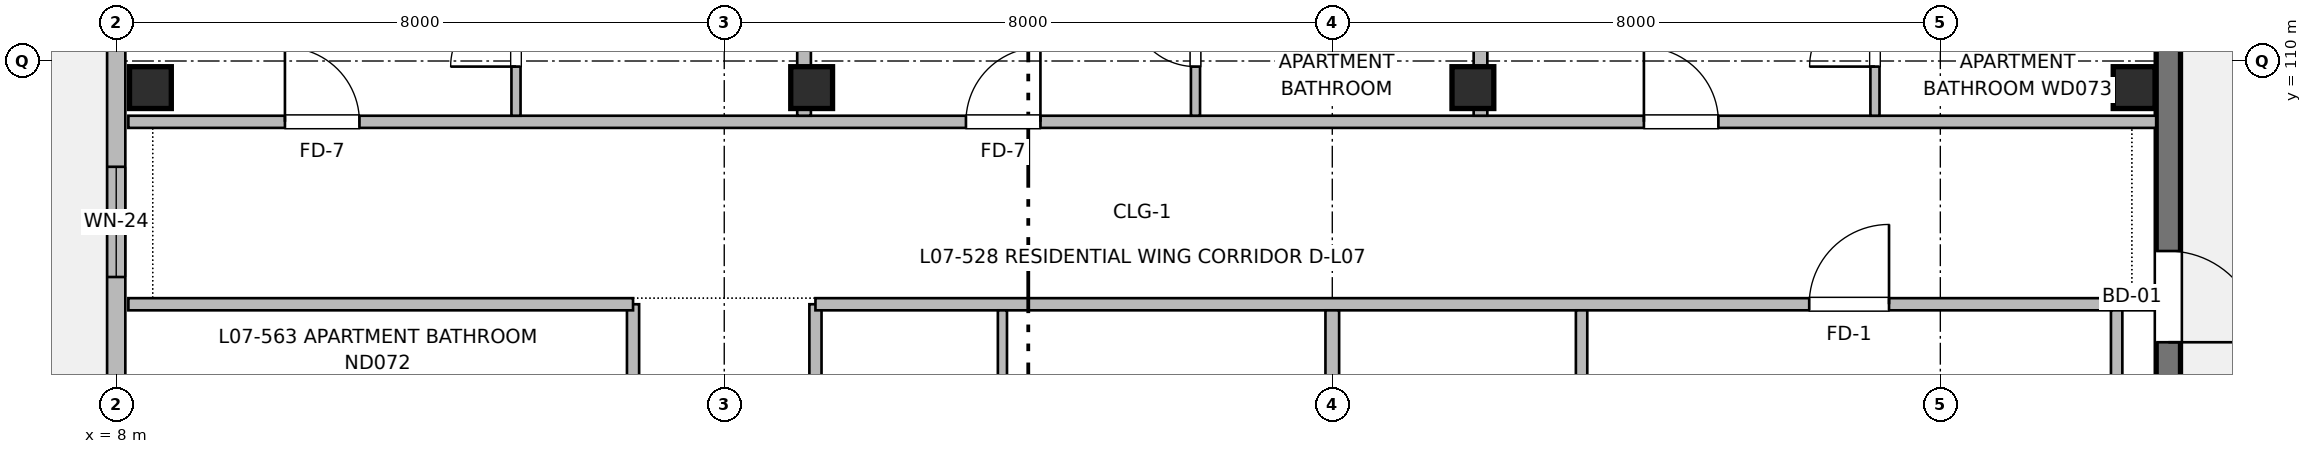
"""IFC4 building model, lengths in metres.
Left out: names, types, materials, properties, quantities, classifications, styles, units other than length and angle.
Written with IfcOpenShell. Run it as: python <this file> out.ifc"""

import sys

from ifc_helpers import new_model, si_unit, direction, frame, frame_2d, origin, origin_2d, place, context, subcontext, project, spatial, rectangle, extrude, element, fill, save


model = new_model("IFC4")
c1 = context("Model", 3, precision=1e-05, world=origin(), true_north=direction((0.0, 1.0)))
c2 = subcontext(c1, "Body", "Model", "MODEL_VIEW")
j1 = project(units=[si_unit("LENGTHUNIT", "METRE"), si_unit("PLANEANGLEUNIT", "RADIAN")], contexts=[c1])
p1 = place(None, origin())
s1 = spatial("IfcSite", under=j1, at=p1, CompositionType="ELEMENT")
p2 = place(p1, origin())
s2 = spatial("IfcBuilding", under=s1, at=p2, CompositionType="ELEMENT")
p3 = place(p2, frame((0.0, 0.0, 23.36)))
s3 = spatial("IfcBuildingStorey", under=s2, at=p3, CompositionType="ELEMENT", Elevation=23.36)
for number, where, z_axis, x_axis in (
    (1, (8.45, 109.65, 0.0), (0.0, 0.0, 1.0), (1.0, 0.0, 0.0)),
    (2, (17.15, 109.65, 0.0), (0.0, 0.0, 1.0), (1.0, 0.0, 0.0)),
    (3, (25.85, 109.65, 0.0), (0.0, 0.0, 1.0), (1.0, 0.0, 0.0)),
    (4, (34.55, 109.65, 0.0), (0.0, 0.0, 1.0), (1.0, 0.0, 0.0)),
):
    element("IfcColumn", number, at=place(p3, frame(where, z_axis=z_axis, x_axis=x_axis)), inside=s3, PredefinedType="COLUMN", context=c2, shape_type="SweptSolid", body=[
        extrude(rectangle(XDim=0.55, YDim=0.55, at=origin_2d()), origin(), (0.0, 0.0, 1.0), 3.2),
    ])
p4 = place(p3, frame((35.0, 113.8, 0.0), z_axis=(0.0, 0.0, 1.0), x_axis=(0.0, -1.0, 0.0)))
e5 = element("IfcWall", 5, at=p4, inside=s3, PredefinedType="SHEAR", context=c2, shape_type="SweptSolid", body=[
    extrude(rectangle(XDim=13.8, YDim=0.32, at=frame_2d((6.9, 0.0))), origin(), (0.0, 0.0, 1.0), 2.98),
])
p5 = place(p4, frame((6.3, 0.0, 0.0)))
e6 = element("IfcOpeningElement", 6, at=p5, cuts=e5, PredefinedType="OPENING", context=c2, shape_type="SweptSolid", body=[
    extrude(rectangle(XDim=1.2, YDim=2.2, at=frame_2d((0.6, 1.1))), frame((0.0, 0.17, 0.0), z_axis=(0.0, -1.0, 0.0), x_axis=(1.0, 0.0, 0.0)), (0.0, 0.0, 1.0), 0.34),
])
p6 = place(p4, frame((8.2, 0.0, 0.67)))
e7 = element("IfcOpeningElement", 7, at=p6, cuts=e5, PredefinedType="OPENING", context=c2, shape_type="SweptSolid", body=[
    extrude(rectangle(XDim=2.6, YDim=1.55, at=frame_2d((1.3, 0.775))), frame((0.0, 0.17, 0.0), z_axis=(0.0, -1.0, 0.0), x_axis=(1.0, 0.0, 0.0)), (0.0, 0.0, 1.0), 0.34),
])
p7 = place(p3, frame((8.0, 64.4, 0.0), z_axis=(0.0, 0.0, 1.0), x_axis=(0.0, 1.0, 0.0)))
e8 = element("IfcWall", 8, at=p7, inside=s3, PredefinedType="SOLIDWALL", context=c2, shape_type="SweptSolid", body=[
    extrude(rectangle(XDim=49.4, YDim=0.24, at=frame_2d((24.7, 0.0))), origin(), (0.0, 0.0, 1.0), 2.98),
])
p8 = place(p7, frame((3.792, 0.0, 0.9)))
e9 = element("IfcOpeningElement", 9, at=p8, cuts=e8, PredefinedType="OPENING", context=c2, shape_type="SweptSolid", body=[
    extrude(rectangle(XDim=0.65, YDim=0.95, at=frame_2d((0.325, 0.475))), frame((0.0, 0.13, 0.0), z_axis=(0.0, -1.0, 0.0), x_axis=(1.0, 0.0, 0.0)), (0.0, 0.0, 1.0), 0.26),
])
p9 = place(p7, frame((11.8, 0.0, 0.62)))
e10 = element("IfcOpeningElement", 10, at=p9, cuts=e8, PredefinedType="OPENING", context=c2, shape_type="SweptSolid", body=[
    extrude(rectangle(XDim=1.1, YDim=1.6, at=frame_2d((0.55, 0.8))), frame((0.0, 0.13, 0.0), z_axis=(0.0, -1.0, 0.0), x_axis=(1.0, 0.0, 0.0)), (0.0, 0.0, 1.0), 0.26),
])
p10 = place(p7, frame((18.683, 0.0, 0.0)))
e11 = element("IfcOpeningElement", 11, at=p10, cuts=e8, PredefinedType="OPENING", context=c2, shape_type="SweptSolid", body=[
    extrude(rectangle(XDim=1.2, YDim=2.2, at=frame_2d((0.6, 1.1))), frame((0.0, 0.13, 0.0), z_axis=(0.0, -1.0, 0.0), x_axis=(1.0, 0.0, 0.0)), (0.0, 0.0, 1.0), 0.26),
])
p11 = place(p7, frame((21.883, 0.0, 0.72)))
e12 = element("IfcOpeningElement", 12, at=p11, cuts=e8, PredefinedType="OPENING", context=c2, shape_type="SweptSolid", body=[
    extrude(rectangle(XDim=1.8, YDim=1.5, at=frame_2d((0.9, 0.75))), frame((0.0, 0.13, 0.0), z_axis=(0.0, -1.0, 0.0), x_axis=(1.0, 0.0, 0.0)), (0.0, 0.0, 1.0), 0.26),
])
p12 = place(p7, frame((29.267, 0.0, 0.72)))
e13 = element("IfcOpeningElement", 13, at=p12, cuts=e8, PredefinedType="OPENING", context=c2, shape_type="SweptSolid", body=[
    extrude(rectangle(XDim=1.7, YDim=1.5, at=frame_2d((0.85, 0.75))), frame((0.0, 0.13, 0.0), z_axis=(0.0, -1.0, 0.0), x_axis=(1.0, 0.0, 0.0)), (0.0, 0.0, 1.0), 0.26),
])
p13 = place(p7, frame((32.9, 0.0, 0.57)))
e14 = element("IfcOpeningElement", 14, at=p13, cuts=e8, PredefinedType="OPENING", context=c2, shape_type="SweptSolid", body=[
    extrude(rectangle(XDim=2.3, YDim=1.65, at=frame_2d((1.15, 0.825))), frame((0.0, 0.13, 0.0), z_axis=(0.0, -1.0, 0.0), x_axis=(1.0, 0.0, 0.0)), (0.0, 0.0, 1.0), 0.26),
])
p14 = place(p7, frame((42.758, 0.0, 0.77)))
e15 = element("IfcOpeningElement", 15, at=p14, cuts=e8, PredefinedType="OPENING", context=c2, shape_type="SweptSolid", body=[
    extrude(rectangle(XDim=1.45, YDim=1.45, at=frame_2d((0.725, 0.725))), frame((0.0, 0.13, 0.0), z_axis=(0.0, -1.0, 0.0), x_axis=(1.0, 0.0, 0.0)), (0.0, 0.0, 1.0), 0.26),
])
p15 = place(p3, frame((14.8, 64.56, 0.0), z_axis=(0.0, 0.0, 1.0), x_axis=(0.0, 1.0, 0.0)))
e16 = element("IfcWall", 16, at=p15, inside=s3, PredefinedType="PARTITIONING", context=c2, shape_type="SweptSolid", body=[
    extrude(rectangle(XDim=42.24, YDim=0.16, at=frame_2d((21.12, 0.0))), origin(), (0.0, 0.0, 1.0), 2.935),
])
p16 = place(p15, frame((4.44, 0.0, 0.0)))
e17 = element("IfcOpeningElement", 17, at=p16, cuts=e16, PredefinedType="OPENING", context=c2, shape_type="SweptSolid", body=[
    extrude(rectangle(XDim=1.1, YDim=2.15, at=frame_2d((0.55, 1.075))), frame((0.0, 0.09, 0.0), z_axis=(0.0, -1.0, 0.0), x_axis=(1.0, 0.0, 0.0)), (0.0, 0.0, 1.0), 0.18),
])
p17 = place(p15, frame((10.84, 0.0, 0.0)))
e18 = element("IfcOpeningElement", 18, at=p17, cuts=e16, PredefinedType="OPENING", context=c2, shape_type="SweptSolid", body=[
    extrude(rectangle(XDim=1.6, YDim=2.15, at=frame_2d((0.8, 1.075))), frame((0.0, 0.09, 0.0), z_axis=(0.0, -1.0, 0.0), x_axis=(1.0, 0.0, 0.0)), (0.0, 0.0, 1.0), 0.18),
])
p18 = place(p15, frame((24.345, 0.0, 0.0)))
e19 = element("IfcOpeningElement", 19, at=p18, cuts=e16, PredefinedType="OPENING", context=c2, shape_type="SweptSolid", body=[
    extrude(rectangle(XDim=0.98, YDim=2.15, at=frame_2d((0.49, 1.075))), frame((0.0, 0.09, 0.0), z_axis=(0.0, -1.0, 0.0), x_axis=(1.0, 0.0, 0.0)), (0.0, 0.0, 1.0), 0.18),
])
p19 = place(p15, frame((32.555, 0.0, 0.0)))
e20 = element("IfcOpeningElement", 20, at=p19, cuts=e16, PredefinedType="OPENING", context=c2, shape_type="SweptSolid", body=[
    extrude(rectangle(XDim=0.98, YDim=2.15, at=frame_2d((0.49, 1.075))), frame((0.0, 0.09, 0.0), z_axis=(0.0, -1.0, 0.0), x_axis=(1.0, 0.0, 0.0)), (0.0, 0.0, 1.0), 0.18),
])
p20 = place(p3, frame((17.2, 64.56, 0.0), z_axis=(0.0, 0.0, 1.0), x_axis=(0.0, 1.0, 0.0)))
e21 = element("IfcWall", 21, at=p20, inside=s3, PredefinedType="PARTITIONING", context=c2, shape_type="SweptSolid", body=[
    extrude(rectangle(XDim=42.24, YDim=0.16, at=frame_2d((21.12, 0.0))), origin(), (0.0, 0.0, 1.0), 2.935),
])
p21 = place(p20, frame((6.53, 0.0, 0.0)))
e22 = element("IfcOpeningElement", 22, at=p21, cuts=e21, PredefinedType="OPENING", context=c2, shape_type="SweptSolid", body=[
    extrude(rectangle(XDim=0.98, YDim=2.15, at=frame_2d((0.49, 1.075))), frame((0.0, 0.09, 0.0), z_axis=(0.0, -1.0, 0.0), x_axis=(1.0, 0.0, 0.0)), (0.0, 0.0, 1.0), 0.18),
])
p22 = place(p20, frame((18.84, 0.0, 0.0)))
e23 = element("IfcOpeningElement", 23, at=p22, cuts=e21, PredefinedType="OPENING", context=c2, shape_type="SweptSolid", body=[
    extrude(rectangle(XDim=1.02, YDim=2.15, at=frame_2d((0.51, 1.075))), frame((0.0, 0.09, 0.0), z_axis=(0.0, -1.0, 0.0), x_axis=(1.0, 0.0, 0.0)), (0.0, 0.0, 1.0), 0.18),
])
p23 = place(p20, frame((29.86, 0.0, 0.0)))
e24 = element("IfcOpeningElement", 24, at=p23, cuts=e21, PredefinedType="OPENING", context=c2, shape_type="SweptSolid", body=[
    extrude(rectangle(XDim=0.98, YDim=2.15, at=frame_2d((0.49, 1.075))), frame((0.0, 0.09, 0.0), z_axis=(0.0, -1.0, 0.0), x_axis=(1.0, 0.0, 0.0)), (0.0, 0.0, 1.0), 0.18),
])
p24 = place(p20, frame((38.86, 0.0, 0.0)))
e25 = element("IfcOpeningElement", 25, at=p24, cuts=e21, PredefinedType="OPENING", context=c2, shape_type="SweptSolid", body=[
    extrude(rectangle(XDim=0.98, YDim=2.15, at=frame_2d((0.49, 1.075))), frame((0.0, 0.09, 0.0), z_axis=(0.0, -1.0, 0.0), x_axis=(1.0, 0.0, 0.0)), (0.0, 0.0, 1.0), 0.18),
])
p25 = place(p3, frame((8.16, 106.8, 0.0), z_axis=(0.0, 0.0, 1.0), x_axis=(1.0, 0.0, 0.0)))
e26 = element("IfcWall", 26, at=p25, inside=s3, PredefinedType="PARTITIONING", context=c2, shape_type="SweptSolid", body=[
    extrude(rectangle(XDim=6.64, YDim=0.16, at=frame_2d((3.32, 0.0))), origin(), (0.0, 0.0, 1.0), 2.935),
])
p26 = place(p3, frame((17.2, 106.8, 0.0), z_axis=(0.0, 0.0, 1.0), x_axis=(1.0, 0.0, 0.0)))
e27 = element("IfcWall", 27, at=p26, inside=s3, PredefinedType="PARTITIONING", context=c2, shape_type="SweptSolid", body=[
    extrude(rectangle(XDim=17.64, YDim=0.16, at=frame_2d((8.82, 0.0))), origin(), (0.0, 0.0, 1.0), 2.935),
])
p27 = place(p26, frame((13.075, 0.0, 0.0)))
e28 = element("IfcOpeningElement", 28, at=p27, cuts=e27, PredefinedType="OPENING", context=c2, shape_type="SweptSolid", body=[
    extrude(rectangle(XDim=1.05, YDim=2.15, at=frame_2d((0.525, 1.075))), frame((0.0, 0.09, 0.0), z_axis=(0.0, -1.0, 0.0), x_axis=(1.0, 0.0, 0.0)), (0.0, 0.0, 1.0), 0.18),
])
p28 = place(p3, frame((8.16, 109.2, 0.0), z_axis=(0.0, 0.0, 1.0), x_axis=(1.0, 0.0, 0.0)))
e29 = element("IfcWall", 29, at=p28, inside=s3, PredefinedType="PARTITIONING", context=c2, shape_type="SweptSolid", body=[
    extrude(rectangle(XDim=26.68, YDim=0.16, at=frame_2d((13.34, 0.0))), origin(), (0.0, 0.0, 1.0), 2.935),
])
p29 = place(p28, frame((2.06, 0.0, 0.0)))
e30 = element("IfcOpeningElement", 30, at=p29, cuts=e29, PredefinedType="OPENING", context=c2, shape_type="SweptSolid", body=[
    extrude(rectangle(XDim=0.98, YDim=2.15, at=frame_2d((0.49, 1.075))), frame((0.0, 0.09, 0.0), z_axis=(0.0, -1.0, 0.0), x_axis=(1.0, 0.0, 0.0)), (0.0, 0.0, 1.0), 0.18),
])
p30 = place(p28, frame((11.02, 0.0, 0.0)))
e31 = element("IfcOpeningElement", 31, at=p30, cuts=e29, PredefinedType="OPENING", context=c2, shape_type="SweptSolid", body=[
    extrude(rectangle(XDim=0.98, YDim=2.15, at=frame_2d((0.49, 1.075))), frame((0.0, 0.09, 0.0), z_axis=(0.0, -1.0, 0.0), x_axis=(1.0, 0.0, 0.0)), (0.0, 0.0, 1.0), 0.18),
])
p31 = place(p28, frame((19.94, 0.0, 0.0)))
e32 = element("IfcOpeningElement", 32, at=p31, cuts=e29, PredefinedType="OPENING", context=c2, shape_type="SweptSolid", body=[
    extrude(rectangle(XDim=0.98, YDim=2.15, at=frame_2d((0.49, 1.075))), frame((0.0, 0.09, 0.0), z_axis=(0.0, -1.0, 0.0), x_axis=(1.0, 0.0, 0.0)), (0.0, 0.0, 1.0), 0.18),
])
p32 = place(p3, frame((24.0, 100.05, 0.0), z_axis=(0.0, 0.0, 1.0), x_axis=(0.0, 1.0, 0.0)))
e33 = element("IfcWall", 33, at=p32, inside=s3, PredefinedType="PARTITIONING", context=c2, shape_type="SweptSolid", body=[
    extrude(rectangle(XDim=6.67, YDim=0.18, at=frame_2d((3.335, 0.0))), origin(), (0.0, 0.0, 1.0), 2.935),
])
for number, where, z_axis, x_axis in (
    (34, (27.28, 103.99, 0.0), (0.0, 0.0, 1.0), (0.0, 1.0, 0.0)),
    (35, (34.32, 103.99, 0.0), (0.0, 0.0, 1.0), (0.0, 1.0, 0.0)),
):
    element("IfcWall", number, at=place(p3, frame(where, z_axis=z_axis, x_axis=x_axis)), inside=s3, PredefinedType="PARTITIONING", context=c2, shape_type="SweptSolid", body=[
        extrude(rectangle(XDim=2.73, YDim=0.15, at=frame_2d((1.365, 0.0))), origin(), (0.0, 0.0, 1.0), 2.935),
    ])
p33 = place(p3, frame((19.66, 99.22, 0.0), z_axis=(0.0, 0.0, 1.0), x_axis=(0.0, 1.0, 0.0)))
e36 = element("IfcWall", 36, at=p33, inside=s3, PredefinedType="PARTITIONING", context=c2, shape_type="SweptSolid", body=[
    extrude(rectangle(XDim=7.5, YDim=0.12, at=frame_2d((3.75, 0.0))), origin(), (0.0, 0.0, 1.0), 2.935),
])
p34 = place(p33, frame((1.311, 0.0, 0.0)))
e37 = element("IfcOpeningElement", 37, at=p34, cuts=e36, PredefinedType="OPENING", context=c2, shape_type="SweptSolid", body=[
    extrude(rectangle(XDim=0.86, YDim=2.1, at=frame_2d((0.43, 1.05))), frame((0.0, 0.07, 0.0), z_axis=(0.0, -1.0, 0.0), x_axis=(1.0, 0.0, 0.0)), (0.0, 0.0, 1.0), 0.14),
])
p35 = place(p33, frame((4.584, 0.0, 0.0)))
e38 = element("IfcOpeningElement", 38, at=p35, cuts=e36, PredefinedType="OPENING", context=c2, shape_type="SweptSolid", body=[
    extrude(rectangle(XDim=0.92, YDim=2.1, at=frame_2d((0.46, 1.05))), frame((0.0, 0.07, 0.0), z_axis=(0.0, -1.0, 0.0), x_axis=(1.0, 0.0, 0.0)), (0.0, 0.0, 1.0), 0.14),
])
for number, where, z_axis, x_axis in (
    (39, (17.05, 109.28, 0.0), (0.0, 0.0, 1.0), (0.0, 1.0, 0.0)),
    (40, (25.95, 109.28, 0.0), (0.0, 0.0, 1.0), (0.0, 1.0, 0.0)),
):
    element("IfcWall", number, at=place(p3, frame(where, z_axis=z_axis, x_axis=x_axis)), inside=s3, PredefinedType="PARTITIONING", context=c2, shape_type="SweptSolid", body=[
        extrude(rectangle(XDim=4.4, YDim=0.18, at=frame_2d((2.2, 0.0))), origin(), (0.0, 0.0, 1.0), 2.935),
    ])
p36 = place(p3, frame((13.26, 109.28, 0.0), z_axis=(0.0, 0.0, 1.0), x_axis=(0.0, 1.0, 0.0)))
e41 = element("IfcWall", 41, at=p36, inside=s3, PredefinedType="PARTITIONING", context=c2, shape_type="SweptSolid", body=[
    extrude(rectangle(XDim=4.4, YDim=0.12, at=frame_2d((2.2, 0.0))), origin(), (0.0, 0.0, 1.0), 2.935),
])
p37 = place(p36, frame((0.646, 0.0, 0.0)))
e42 = element("IfcOpeningElement", 42, at=p37, cuts=e41, PredefinedType="OPENING", context=c2, shape_type="SweptSolid", body=[
    extrude(rectangle(XDim=0.86, YDim=2.1, at=frame_2d((0.43, 1.05))), frame((0.0, 0.07, 0.0), z_axis=(0.0, -1.0, 0.0), x_axis=(1.0, 0.0, 0.0)), (0.0, 0.0, 1.0), 0.14),
])
p38 = place(p36, frame((3.091, 0.0, 0.0)))
e43 = element("IfcOpeningElement", 43, at=p38, cuts=e41, PredefinedType="OPENING", context=c2, shape_type="SweptSolid", body=[
    extrude(rectangle(XDim=0.9, YDim=2.1, at=frame_2d((0.45, 1.05))), frame((0.0, 0.07, 0.0), z_axis=(0.0, -1.0, 0.0), x_axis=(1.0, 0.0, 0.0)), (0.0, 0.0, 1.0), 0.14),
])
p39 = place(p3, frame((22.2, 109.28, 0.0), z_axis=(0.0, 0.0, 1.0), x_axis=(0.0, 1.0, 0.0)))
e44 = element("IfcWall", 44, at=p39, inside=s3, PredefinedType="PARTITIONING", context=c2, shape_type="SweptSolid", body=[
    extrude(rectangle(XDim=4.4, YDim=0.12, at=frame_2d((2.2, 0.0))), origin(), (0.0, 0.0, 1.0), 2.935),
])
p40 = place(p39, frame((0.646, 0.0, 0.0)))
e45 = element("IfcOpeningElement", 45, at=p40, cuts=e44, PredefinedType="OPENING", context=c2, shape_type="SweptSolid", body=[
    extrude(rectangle(XDim=0.86, YDim=2.1, at=frame_2d((0.43, 1.05))), frame((0.0, 0.07, 0.0), z_axis=(0.0, -1.0, 0.0), x_axis=(1.0, 0.0, 0.0)), (0.0, 0.0, 1.0), 0.14),
])
p41 = place(p39, frame((3.091, 0.0, 0.0)))
e46 = element("IfcOpeningElement", 46, at=p41, cuts=e44, PredefinedType="OPENING", context=c2, shape_type="SweptSolid", body=[
    extrude(rectangle(XDim=0.9, YDim=2.1, at=frame_2d((0.45, 1.05))), frame((0.0, 0.07, 0.0), z_axis=(0.0, -1.0, 0.0), x_axis=(1.0, 0.0, 0.0)), (0.0, 0.0, 1.0), 0.14),
])
p42 = place(p3, frame((31.14, 109.28, 0.0), z_axis=(0.0, 0.0, 1.0), x_axis=(0.0, 1.0, 0.0)))
e47 = element("IfcWall", 47, at=p42, inside=s3, PredefinedType="PARTITIONING", context=c2, shape_type="SweptSolid", body=[
    extrude(rectangle(XDim=4.4, YDim=0.12, at=frame_2d((2.2, 0.0))), origin(), (0.0, 0.0, 1.0), 2.935),
])
p43 = place(p42, frame((0.646, 0.0, 0.0)))
e48 = element("IfcOpeningElement", 48, at=p43, cuts=e47, PredefinedType="OPENING", context=c2, shape_type="SweptSolid", body=[
    extrude(rectangle(XDim=0.86, YDim=2.1, at=frame_2d((0.43, 1.05))), frame((0.0, 0.07, 0.0), z_axis=(0.0, -1.0, 0.0), x_axis=(1.0, 0.0, 0.0)), (0.0, 0.0, 1.0), 0.14),
])
p44 = place(p42, frame((3.091, 0.0, 0.0)))
e49 = element("IfcOpeningElement", 49, at=p44, cuts=e47, PredefinedType="OPENING", context=c2, shape_type="SweptSolid", body=[
    extrude(rectangle(XDim=0.9, YDim=2.1, at=frame_2d((0.45, 1.05))), frame((0.0, 0.07, 0.0), z_axis=(0.0, -1.0, 0.0), x_axis=(1.0, 0.0, 0.0)), (0.0, 0.0, 1.0), 0.14),
])
p45 = place(p5, origin())
e50 = element("IfcDoor", 50, at=p45, inside=s3, OperationType="SINGLE_SWING_RIGHT", PredefinedType="DOOR", context=c2, shape_type="SweptSolid", body=[
    extrude(rectangle(XDim=1.2, YDim=2.2, at=frame_2d((0.6, 1.1))), frame((0.0, 0.025, 0.0), z_axis=(0.0, -1.0, 0.0), x_axis=(1.0, 0.0, 0.0)), (0.0, 0.0, 1.0), 0.05),
])
fill(e6, e50)
p46 = place(p14, origin())
e51 = element("IfcWindow", 51, at=p46, inside=s3, PartitioningType="SINGLE_PANEL", PredefinedType="WINDOW", context=c2, shape_type="SweptSolid", body=[
    extrude(rectangle(XDim=1.45, YDim=1.45, at=frame_2d((0.725, 0.725))), frame((0.0, 0.03, 0.0), z_axis=(0.0, -1.0, 0.0), x_axis=(1.0, 0.0, 0.0)), (0.0, 0.0, 1.0), 0.06),
])
fill(e15, e51)
p47 = place(p27, origin())
e52 = element("IfcDoor", 52, at=p47, inside=s3, OperationType="SINGLE_SWING_RIGHT", PredefinedType="DOOR", context=c2, shape_type="SweptSolid", body=[
    extrude(rectangle(XDim=1.05, YDim=2.15, at=frame_2d((0.525, 1.075))), frame((0.0, 0.025, 0.0), z_axis=(0.0, -1.0, 0.0), x_axis=(1.0, 0.0, 0.0)), (0.0, 0.0, 1.0), 0.05),
])
fill(e28, e52)
p48 = place(p29, origin())
e53 = element("IfcDoor", 53, at=p48, inside=s3, OperationType="SINGLE_SWING_LEFT", PredefinedType="DOOR", context=c2, shape_type="SweptSolid", body=[
    extrude(rectangle(XDim=0.98, YDim=2.15, at=frame_2d((0.49, 1.075))), frame((0.0, 0.025, 0.0), z_axis=(0.0, -1.0, 0.0), x_axis=(1.0, 0.0, 0.0)), (0.0, 0.0, 1.0), 0.05),
])
fill(e30, e53)
p49 = place(p37, origin())
e54 = element("IfcDoor", 54, at=p49, inside=s3, OperationType="SINGLE_SWING_LEFT", PredefinedType="DOOR", context=c2, shape_type="SweptSolid", body=[
    extrude(rectangle(XDim=0.86, YDim=2.1, at=frame_2d((0.43, 1.05))), frame((0.0, 0.025, 0.0), z_axis=(0.0, -1.0, 0.0), x_axis=(1.0, 0.0, 0.0)), (0.0, 0.0, 1.0), 0.05),
])
fill(e42, e54)
p50 = place(p30, origin())
e55 = element("IfcDoor", 55, at=p50, inside=s3, OperationType="SINGLE_SWING_RIGHT", PredefinedType="DOOR", context=c2, shape_type="SweptSolid", body=[
    extrude(rectangle(XDim=0.98, YDim=2.15, at=frame_2d((0.49, 1.075))), frame((0.0, 0.025, 0.0), z_axis=(0.0, -1.0, 0.0), x_axis=(1.0, 0.0, 0.0)), (0.0, 0.0, 1.0), 0.05),
])
fill(e31, e55)
p51 = place(p40, origin())
e56 = element("IfcDoor", 56, at=p51, inside=s3, OperationType="SINGLE_SWING_RIGHT", PredefinedType="DOOR", context=c2, shape_type="SweptSolid", body=[
    extrude(rectangle(XDim=0.86, YDim=2.1, at=frame_2d((0.43, 1.05))), frame((0.0, 0.025, 0.0), z_axis=(0.0, -1.0, 0.0), x_axis=(1.0, 0.0, 0.0)), (0.0, 0.0, 1.0), 0.05),
])
fill(e45, e56)
p52 = place(p31, origin())
e57 = element("IfcDoor", 57, at=p52, inside=s3, OperationType="SINGLE_SWING_LEFT", PredefinedType="DOOR", context=c2, shape_type="SweptSolid", body=[
    extrude(rectangle(XDim=0.98, YDim=2.15, at=frame_2d((0.49, 1.075))), frame((0.0, 0.025, 0.0), z_axis=(0.0, -1.0, 0.0), x_axis=(1.0, 0.0, 0.0)), (0.0, 0.0, 1.0), 0.05),
])
fill(e32, e57)
p53 = place(p43, origin())
e58 = element("IfcDoor", 58, at=p53, inside=s3, OperationType="SINGLE_SWING_LEFT", PredefinedType="DOOR", context=c2, shape_type="SweptSolid", body=[
    extrude(rectangle(XDim=0.86, YDim=2.1, at=frame_2d((0.43, 1.05))), frame((0.0, 0.025, 0.0), z_axis=(0.0, -1.0, 0.0), x_axis=(1.0, 0.0, 0.0)), (0.0, 0.0, 1.0), 0.05),
])
fill(e48, e58)
save(model, sys.argv[1])
